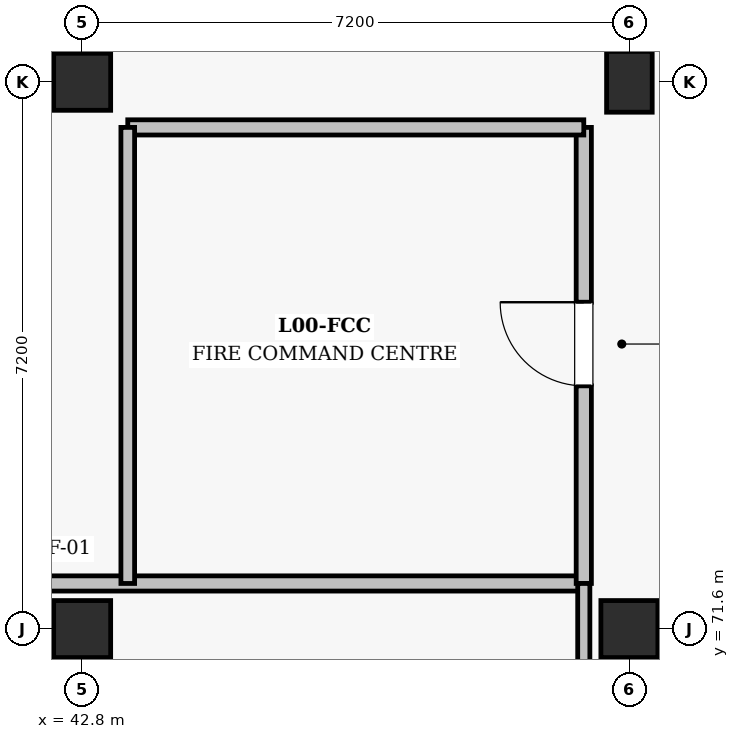
"""IFC4 building model, lengths in metres.
Left out: names, types, materials, properties, quantities, classifications, styles, units other than length and angle.
Written with IfcOpenShell. Run it as: python <this file> out.ifc"""

import sys

from ifc_helpers import new_model, si_unit, direction, frame, frame_2d, origin, origin_2d, place, context, subcontext, project, spatial, rectangle, circle, extrude, element, fill, save


model = new_model("IFC4")
c1 = context("Model", 3, precision=1e-05, world=origin(), true_north=direction((0.0, 1.0)))
c2 = subcontext(c1, "Body", "Model", "MODEL_VIEW")
j1 = project(units=[si_unit("LENGTHUNIT", "METRE"), si_unit("PLANEANGLEUNIT", "RADIAN")], contexts=[c1])
p1 = place(None, origin())
s1 = spatial("IfcSite", under=j1, at=p1, CompositionType="ELEMENT")
p2 = place(p1, origin())
s2 = spatial("IfcBuilding", under=s1, at=p2, CompositionType="ELEMENT")
p3 = place(p2, origin())
s3 = spatial("IfcBuildingStorey", under=s2, at=p3, CompositionType="ELEMENT", Elevation=0.0)
for number, where, z_axis, x_axis in (
    (1, (42.8, 71.6, 0.0), (0.0, 0.0, 1.0), (1.0, 0.0, 0.0)),
    (2, (42.8, 78.8, 0.0), (0.0, 0.0, 1.0), (1.0, 0.0, 0.0)),
    (3, (50.0, 71.6, 0.0), (0.0, 0.0, 1.0), (1.0, 0.0, 0.0)),
):
    element("IfcColumn", number, at=place(p3, frame(where, z_axis=z_axis, x_axis=x_axis)), inside=s3, PredefinedType="COLUMN", context=c2, shape_type="SweptSolid", body=[
        extrude(circle(Radius=0.375, at=origin_2d()), origin(), (0.0, 0.0, 1.0), 5.4),
    ])
p4 = place(p3, frame((50.0, 78.8, 0.0), z_axis=(0.0, 0.0, 1.0), x_axis=(1.0, 0.0, 0.0)))
e4 = element("IfcColumn", 4, at=p4, inside=s3, PredefinedType="COLUMN", context=c2, shape_type="SweptSolid", body=[
    extrude(rectangle(XDim=0.6, YDim=0.8, at=origin_2d()), origin(), (0.0, 0.0, 1.0), 5.4),
])
p5 = place(p3, frame((35.6, 72.2, 0.0), z_axis=(0.0, 0.0, 1.0), x_axis=(1.0, 0.0, 0.0)))
e5 = element("IfcWall", 5, at=p5, inside=s3, PredefinedType="SOLIDWALL", context=c2, shape_type="SweptSolid", body=[
    extrude(rectangle(XDim=13.8, YDim=0.2, at=frame_2d((6.9, 0.0))), origin(), (0.0, 0.0, 1.0), 4.46),
])
p6 = place(p3, frame((49.4, 72.2, 0.0), z_axis=(0.0, 0.0, 1.0), x_axis=(0.0, 1.0, 0.0)))
e6 = element("IfcWall", 6, at=p6, inside=s3, PredefinedType="SOLIDWALL", context=c2, shape_type="SweptSolid", body=[
    extrude(rectangle(XDim=6.0, YDim=0.2, at=frame_2d((3.0, 0.0))), origin(), (0.0, 0.0, 1.0), 5.02),
])
p7 = place(p6, frame((2.6, 0.0, 0.0)))
e7 = element("IfcOpeningElement", 7, at=p7, cuts=e6, PredefinedType="OPENING", context=c2, shape_type="SweptSolid", body=[
    extrude(rectangle(XDim=1.1, YDim=2.15, at=frame_2d((0.55, 1.075))), frame((0.0, 0.11, 0.0), z_axis=(0.0, -1.0, 0.0), x_axis=(1.0, 0.0, 0.0)), (0.0, 0.0, 1.0), 0.22),
])
p8 = place(p3, frame((43.4, 78.2, 0.0), z_axis=(0.0, 0.0, 1.0), x_axis=(1.0, 0.0, 0.0)))
e8 = element("IfcWall", 8, at=p8, inside=s3, PredefinedType="SOLIDWALL", context=c2, shape_type="SweptSolid", body=[
    extrude(rectangle(XDim=6.0, YDim=0.2, at=frame_2d((3.0, 0.0))), origin(), (0.0, 0.0, 1.0), 5.02),
])
p9 = place(p3, frame((43.4, 72.2, 0.0), z_axis=(0.0, 0.0, 1.0), x_axis=(0.0, 1.0, 0.0)))
e9 = element("IfcWall", 9, at=p9, inside=s3, PredefinedType="SOLIDWALL", context=c2, shape_type="SweptSolid", body=[
    extrude(rectangle(XDim=6.0, YDim=0.18, at=frame_2d((3.0, 0.0))), origin(), (0.0, 0.0, 1.0), 5.02),
])
p10 = place(p3, frame((49.4, 52.68, 0.0), z_axis=(0.0, 0.0, 1.0), x_axis=(0.0, 1.0, 0.0)))
e10 = element("IfcWall", 10, at=p10, inside=s3, PredefinedType="PARTITIONING", context=c2, shape_type="SweptSolid", body=[
    extrude(rectangle(XDim=19.52, YDim=0.16, at=frame_2d((9.76, 0.0))), origin(), (0.0, 0.0, 1.0), 4.34),
])
p11 = place(p10, frame((2.97, 0.0, 0.0)))
e11 = element("IfcOpeningElement", 11, at=p11, cuts=e10, PredefinedType="OPENING", context=c2, shape_type="SweptSolid", body=[
    extrude(rectangle(XDim=1.9, YDim=2.3, at=frame_2d((0.95, 1.15))), frame((0.0, 0.09, 0.0), z_axis=(0.0, -1.0, 0.0), x_axis=(1.0, 0.0, 0.0)), (0.0, 0.0, 1.0), 0.18),
])
p12 = place(p7, origin())
e12 = element("IfcDoor", 12, at=p12, inside=s3, OperationType="SINGLE_SWING_RIGHT", PredefinedType="DOOR", context=c2, shape_type="SweptSolid", body=[
    extrude(rectangle(XDim=1.1, YDim=2.15, at=frame_2d((0.55, 1.075))), frame((0.0, 0.025, 0.0), z_axis=(0.0, -1.0, 0.0), x_axis=(1.0, 0.0, 0.0)), (0.0, 0.0, 1.0), 0.05),
])
fill(e7, e12)
save(model, sys.argv[1])
